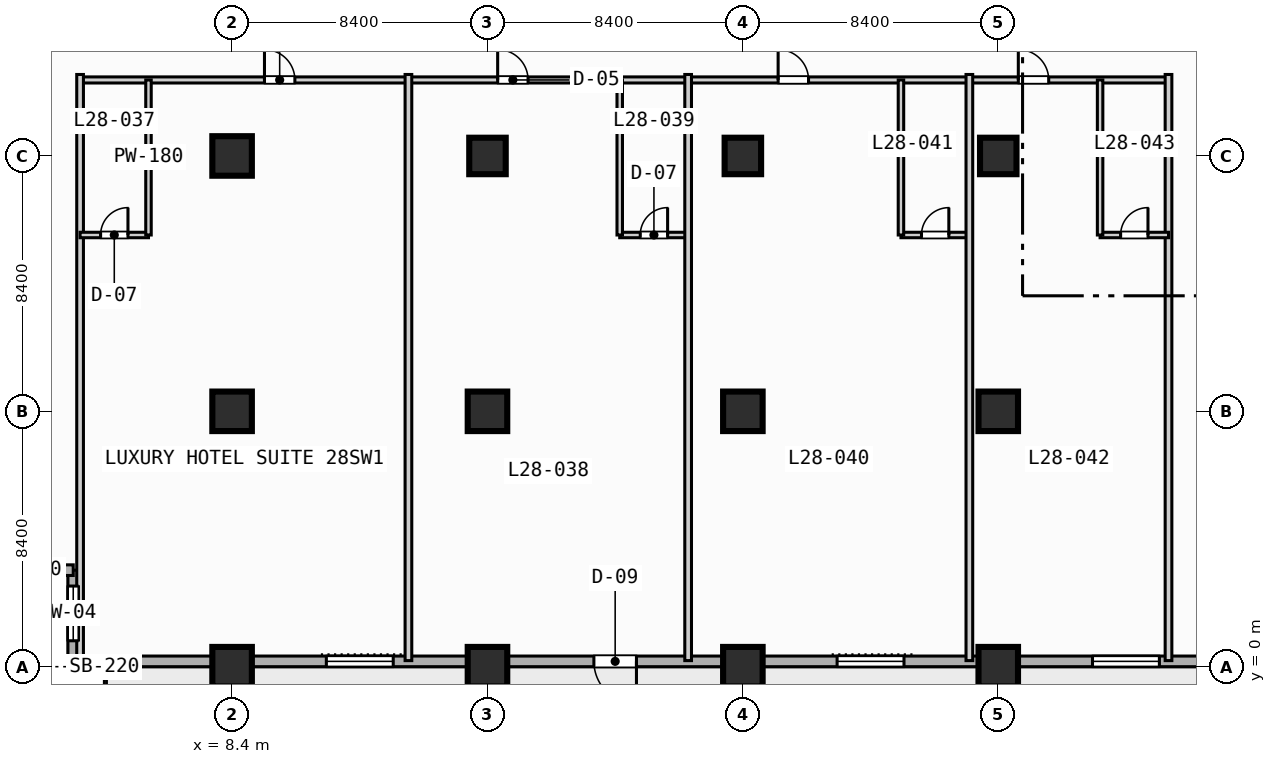
"""IFC4 building model, lengths in metres.
Left out: names, types, materials, properties, quantities, classifications, styles, units other than length and angle.
Written with IfcOpenShell. Run it as: python <this file> out.ifc"""

import sys

from ifc_helpers import new_model, si_unit, direction, frame, frame_2d, origin, origin_2d, place, context, subcontext, project, spatial, rectangle, extrude, element, fill, save


model = new_model("IFC4")
c1 = context("Model", 3, precision=1e-05, world=origin(), true_north=direction((0.0, 1.0)))
c2 = subcontext(c1, "Body", "Model", "MODEL_VIEW")
j1 = project(units=[si_unit("LENGTHUNIT", "METRE"), si_unit("PLANEANGLEUNIT", "RADIAN")], contexts=[c1])
p1 = place(None, origin())
s1 = spatial("IfcSite", under=j1, at=p1, CompositionType="ELEMENT")
p2 = place(p1, origin())
s2 = spatial("IfcBuilding", under=s1, at=p2, CompositionType="ELEMENT")
p3 = place(p2, frame((0.0, 0.0, 119.0)))
s3 = spatial("IfcBuildingStorey", under=s2, at=p3, CompositionType="ELEMENT", Elevation=119.0)
for number, where, z_axis, x_axis in (
    (1, (8.4, 0.0, 0.0), (0.0, 0.0, 1.0), (1.0, 0.0, 0.0)),
    (2, (8.4, 8.4, 0.0), (0.0, 0.0, 1.0), (1.0, 0.0, 0.0)),
    (3, (8.4, 16.8, 0.0), (0.0, 0.0, 1.0), (1.0, 0.0, 0.0)),
    (4, (16.8, 0.0, 0.0), (0.0, 0.0, 1.0), (1.0, 0.0, 0.0)),
    (5, (16.8, 8.4, 0.0), (0.0, 0.0, 1.0), (1.0, 0.0, 0.0)),
):
    element("IfcColumn", number, at=place(p3, frame(where, z_axis=z_axis, x_axis=x_axis)), inside=s3, PredefinedType="COLUMN", context=c2, shape_type="SweptSolid", body=[
        extrude(rectangle(XDim=1.3, YDim=1.3, at=origin_2d()), origin(), (0.0, 0.0, 1.0), 3.8),
    ])
p4 = place(p3, frame((16.8, 16.8, 0.0), z_axis=(0.0, 0.0, 1.0), x_axis=(1.0, 0.0, 0.0)))
e6 = element("IfcColumn", 6, at=p4, inside=s3, PredefinedType="COLUMN", context=c2, shape_type="SweptSolid", body=[
    extrude(rectangle(XDim=1.2, YDim=1.2, at=origin_2d()), origin(), (0.0, 0.0, 1.0), 3.8),
])
for number, where, z_axis, x_axis in (
    (7, (25.2, 0.0, 0.0), (0.0, 0.0, 1.0), (1.0, 0.0, 0.0)),
    (8, (25.2, 8.4, 0.0), (0.0, 0.0, 1.0), (1.0, 0.0, 0.0)),
):
    element("IfcColumn", number, at=place(p3, frame(where, z_axis=z_axis, x_axis=x_axis)), inside=s3, PredefinedType="COLUMN", context=c2, shape_type="SweptSolid", body=[
        extrude(rectangle(XDim=1.3, YDim=1.3, at=origin_2d()), origin(), (0.0, 0.0, 1.0), 3.8),
    ])
p5 = place(p3, frame((25.2, 16.8, 0.0), z_axis=(0.0, 0.0, 1.0), x_axis=(1.0, 0.0, 0.0)))
e9 = element("IfcColumn", 9, at=p5, inside=s3, PredefinedType="COLUMN", context=c2, shape_type="SweptSolid", body=[
    extrude(rectangle(XDim=1.2, YDim=1.2, at=origin_2d()), origin(), (0.0, 0.0, 1.0), 3.8),
])
for number, where, z_axis, x_axis in (
    (10, (33.6, 0.0, 0.0), (0.0, 0.0, 1.0), (1.0, 0.0, 0.0)),
    (11, (33.6, 8.4, 0.0), (0.0, 0.0, 1.0), (1.0, 0.0, 0.0)),
):
    element("IfcColumn", number, at=place(p3, frame(where, z_axis=z_axis, x_axis=x_axis)), inside=s3, PredefinedType="COLUMN", context=c2, shape_type="SweptSolid", body=[
        extrude(rectangle(XDim=1.3, YDim=1.3, at=origin_2d()), origin(), (0.0, 0.0, 1.0), 3.8),
    ])
p6 = place(p3, frame((33.6, 16.8, 0.0), z_axis=(0.0, 0.0, 1.0), x_axis=(1.0, 0.0, 0.0)))
e12 = element("IfcColumn", 12, at=p6, inside=s3, PredefinedType="COLUMN", context=c2, shape_type="SweptSolid", body=[
    extrude(rectangle(XDim=1.2, YDim=1.2, at=origin_2d()), origin(), (0.0, 0.0, 1.0), 3.8),
])
p7 = place(p3, frame((3.175, 0.175, 0.0), z_axis=(0.0, 0.0, 1.0), x_axis=(0.0, 1.0, 0.0)))
e13 = element("IfcWall", 13, at=p7, inside=s3, PredefinedType="STANDARD", context=c2, shape_type="SweptSolid", body=[
    extrude(rectangle(XDim=3.0, YDim=0.35, at=frame_2d((1.5, 0.0))), origin(), (0.0, 0.0, 1.0), 3.55),
])
p8 = place(p7, frame((0.677, 0.0, 0.85)))
e14 = element("IfcOpeningElement", 14, at=p8, cuts=e13, PredefinedType="OPENING", context=c2, shape_type="SweptSolid", body=[
    extrude(rectangle(XDim=1.8, YDim=1.8, at=frame_2d((0.9, 0.9))), frame((0.0, 0.185, 0.0), z_axis=(0.0, -1.0, 0.0), x_axis=(1.0, 0.0, 0.0)), (0.0, 0.0, 1.0), 0.37),
])
p9 = place(p3, frame((3.175, 3.175, 0.0), z_axis=(0.0, 0.0, 1.0), x_axis=(-1.0, 0.0, 0.0)))
e15 = element("IfcWall", 15, at=p9, inside=s3, PredefinedType="STANDARD", context=c2, shape_type="SweptSolid", body=[
    extrude(rectangle(XDim=3.0, YDim=0.35, at=frame_2d((1.5, 0.0))), origin(), (0.0, 0.0, 1.0), 3.55),
])
p10 = place(p3, frame((72.425, 0.175, 0.0), z_axis=(0.0, 0.0, 1.0), x_axis=(-1.0, 0.0, 0.0)))
e16 = element("IfcWall", 16, at=p10, inside=s3, PredefinedType="STANDARD", context=c2, shape_type="SweptSolid", body=[
    extrude(rectangle(XDim=69.25, YDim=0.35, at=frame_2d((34.625, 0.0))), origin(), (0.0, 0.0, 1.0), 3.55),
])
p11 = place(p10, frame((50.725, 0.0, 0.0)))
e17 = element("IfcOpeningElement", 17, at=p11, cuts=e16, PredefinedType="OPENING", context=c2, shape_type="SweptSolid", body=[
    extrude(rectangle(XDim=1.4, YDim=2.2, at=frame_2d((0.7, 1.1))), frame((0.0, 0.185, 0.0), z_axis=(0.0, -1.0, 0.0), x_axis=(1.0, 0.0, 0.0)), (0.0, 0.0, 1.0), 0.37),
])
p12 = place(p10, frame((58.725, 0.0, 0.85)))
e18 = element("IfcOpeningElement", 18, at=p12, cuts=e16, PredefinedType="OPENING", context=c2, shape_type="SweptSolid", body=[
    extrude(rectangle(XDim=2.2, YDim=1.8, at=frame_2d((1.1, 0.9))), frame((0.0, 0.185, 0.0), z_axis=(0.0, -1.0, 0.0), x_axis=(1.0, 0.0, 0.0)), (0.0, 0.0, 1.0), 0.37),
])
p13 = place(p10, frame((41.925, 0.0, 0.85)))
e19 = element("IfcOpeningElement", 19, at=p13, cuts=e16, PredefinedType="OPENING", context=c2, shape_type="SweptSolid", body=[
    extrude(rectangle(XDim=2.2, YDim=1.8, at=frame_2d((1.1, 0.9))), frame((0.0, 0.185, 0.0), z_axis=(0.0, -1.0, 0.0), x_axis=(1.0, 0.0, 0.0)), (0.0, 0.0, 1.0), 0.37),
])
p14 = place(p10, frame((33.525, 0.0, 0.85)))
e20 = element("IfcOpeningElement", 20, at=p14, cuts=e16, PredefinedType="OPENING", context=c2, shape_type="SweptSolid", body=[
    extrude(rectangle(XDim=2.2, YDim=1.8, at=frame_2d((1.1, 0.9))), frame((0.0, 0.185, 0.0), z_axis=(0.0, -1.0, 0.0), x_axis=(1.0, 0.0, 0.0)), (0.0, 0.0, 1.0), 0.37),
])
p15 = place(p10, frame((25.125, 0.0, 0.85)))
e21 = element("IfcOpeningElement", 21, at=p15, cuts=e16, PredefinedType="OPENING", context=c2, shape_type="SweptSolid", body=[
    extrude(rectangle(XDim=2.2, YDim=1.8, at=frame_2d((1.1, 0.9))), frame((0.0, 0.185, 0.0), z_axis=(0.0, -1.0, 0.0), x_axis=(1.0, 0.0, 0.0)), (0.0, 0.0, 1.0), 0.37),
])
p16 = place(p10, frame((8.325, 0.0, 0.85)))
e22 = element("IfcOpeningElement", 22, at=p16, cuts=e16, PredefinedType="OPENING", context=c2, shape_type="SweptSolid", body=[
    extrude(rectangle(XDim=2.2, YDim=1.8, at=frame_2d((1.1, 0.9))), frame((0.0, 0.185, 0.0), z_axis=(0.0, -1.0, 0.0), x_axis=(1.0, 0.0, 0.0)), (0.0, 0.0, 1.0), 0.37),
])
p17 = place(p10, frame((2.125, 0.0, 0.85)))
e23 = element("IfcOpeningElement", 23, at=p17, cuts=e16, PredefinedType="OPENING", context=c2, shape_type="SweptSolid", body=[
    extrude(rectangle(XDim=1.8, YDim=1.8, at=frame_2d((0.9, 0.9))), frame((0.0, 0.185, 0.0), z_axis=(0.0, -1.0, 0.0), x_axis=(1.0, 0.0, 0.0)), (0.0, 0.0, 1.0), 0.37),
])
p18 = place(p3, frame((3.4, 19.3, 0.0), z_axis=(0.0, 0.0, 1.0), x_axis=(1.0, 0.0, 0.0)))
e24 = element("IfcWall", 24, at=p18, inside=s3, PredefinedType="PARTITIONING", context=c2, shape_type="SweptSolid", body=[
    extrude(rectangle(XDim=35.8, YDim=0.2, at=frame_2d((17.9, 0.0))), origin(), (0.0, 0.0, 1.0), 3.55),
])
p19 = place(p18, frame((6.065, 0.0, 0.0)))
e25 = element("IfcOpeningElement", 25, at=p19, cuts=e24, PredefinedType="OPENING", context=c2, shape_type="SweptSolid", body=[
    extrude(rectangle(XDim=1.0, YDim=2.15, at=frame_2d((0.5, 1.075))), frame((0.0, 0.11, 0.0), z_axis=(0.0, -1.0, 0.0), x_axis=(1.0, 0.0, 0.0)), (0.0, 0.0, 1.0), 0.22),
])
p20 = place(p18, frame((13.735, 0.0, 0.0)))
e26 = element("IfcOpeningElement", 26, at=p20, cuts=e24, PredefinedType="OPENING", context=c2, shape_type="SweptSolid", body=[
    extrude(rectangle(XDim=1.0, YDim=2.15, at=frame_2d((0.5, 1.075))), frame((0.0, 0.11, 0.0), z_axis=(0.0, -1.0, 0.0), x_axis=(1.0, 0.0, 0.0)), (0.0, 0.0, 1.0), 0.22),
])
p21 = place(p18, frame((22.96, 0.0, 0.0)))
e27 = element("IfcOpeningElement", 27, at=p21, cuts=e24, PredefinedType="OPENING", context=c2, shape_type="SweptSolid", body=[
    extrude(rectangle(XDim=1.0, YDim=2.15, at=frame_2d((0.5, 1.075))), frame((0.0, 0.11, 0.0), z_axis=(0.0, -1.0, 0.0), x_axis=(1.0, 0.0, 0.0)), (0.0, 0.0, 1.0), 0.22),
])
p22 = place(p18, frame((30.86, 0.0, 0.0)))
e28 = element("IfcOpeningElement", 28, at=p22, cuts=e24, PredefinedType="OPENING", context=c2, shape_type="SweptSolid", body=[
    extrude(rectangle(XDim=1.0, YDim=2.15, at=frame_2d((0.5, 1.075))), frame((0.0, 0.11, 0.0), z_axis=(0.0, -1.0, 0.0), x_axis=(1.0, 0.0, 0.0)), (0.0, 0.0, 1.0), 0.22),
])
p23 = place(p3, frame((3.4, 0.2, 0.0), z_axis=(0.0, 0.0, 1.0), x_axis=(0.0, 1.0, 0.0)))
e29 = element("IfcWall", 29, at=p23, inside=s3, PredefinedType="PARTITIONING", context=c2, shape_type="SweptSolid", body=[
    extrude(rectangle(XDim=19.28, YDim=0.22, at=frame_2d((9.64, 0.0))), origin(), (0.0, 0.0, 1.0), 3.55),
])
p24 = place(p3, frame((3.4, 14.2, 0.0), z_axis=(0.0, 0.0, 1.0), x_axis=(1.0, 0.0, 0.0)))
e30 = element("IfcWall", 30, at=p24, inside=s3, PredefinedType="PLUMBINGWALL", context=c2, shape_type="SweptSolid", body=[
    extrude(rectangle(XDim=2.25, YDim=0.18, at=frame_2d((1.125, 0.0))), origin(), (0.0, 0.0, 1.0), 3.55),
])
p25 = place(p24, frame((0.675, 0.0, 0.0)))
e31 = element("IfcOpeningElement", 31, at=p25, cuts=e30, PredefinedType="OPENING", context=c2, shape_type="SweptSolid", body=[
    extrude(rectangle(XDim=0.9, YDim=2.1, at=frame_2d((0.45, 1.05))), frame((0.0, 0.1, 0.0), z_axis=(0.0, -1.0, 0.0), x_axis=(1.0, 0.0, 0.0)), (0.0, 0.0, 1.0), 0.2),
])
p26 = place(p3, frame((5.65, 14.2, 0.0), z_axis=(0.0, 0.0, 1.0), x_axis=(0.0, 1.0, 0.0)))
e32 = element("IfcWall", 32, at=p26, inside=s3, PredefinedType="PLUMBINGWALL", context=c2, shape_type="SweptSolid", body=[
    extrude(rectangle(XDim=5.1, YDim=0.18, at=frame_2d((2.55, 0.0))), origin(), (0.0, 0.0, 1.0), 3.55),
])
p27 = place(p3, frame((14.2, 0.2, 0.0), z_axis=(0.0, 0.0, 1.0), x_axis=(0.0, 1.0, 0.0)))
e33 = element("IfcWall", 33, at=p27, inside=s3, PredefinedType="PARTITIONING", context=c2, shape_type="SweptSolid", body=[
    extrude(rectangle(XDim=19.28, YDim=0.22, at=frame_2d((9.64, 0.0))), origin(), (0.0, 0.0, 1.0), 3.55),
])
p28 = place(p3, frame((21.15, 14.2, 0.0), z_axis=(0.0, 0.0, 1.0), x_axis=(1.0, 0.0, 0.0)))
e34 = element("IfcWall", 34, at=p28, inside=s3, PredefinedType="PLUMBINGWALL", context=c2, shape_type="SweptSolid", body=[
    extrude(rectangle(XDim=2.25, YDim=0.18, at=frame_2d((1.125, 0.0))), origin(), (0.0, 0.0, 1.0), 3.55),
])
p29 = place(p28, frame((0.675, 0.0, 0.0)))
e35 = element("IfcOpeningElement", 35, at=p29, cuts=e34, PredefinedType="OPENING", context=c2, shape_type="SweptSolid", body=[
    extrude(rectangle(XDim=0.9, YDim=2.1, at=frame_2d((0.45, 1.05))), frame((0.0, 0.1, 0.0), z_axis=(0.0, -1.0, 0.0), x_axis=(1.0, 0.0, 0.0)), (0.0, 0.0, 1.0), 0.2),
])
p30 = place(p3, frame((21.15, 14.2, 0.0), z_axis=(0.0, 0.0, 1.0), x_axis=(0.0, 1.0, 0.0)))
e36 = element("IfcWall", 36, at=p30, inside=s3, PredefinedType="PLUMBINGWALL", context=c2, shape_type="SweptSolid", body=[
    extrude(rectangle(XDim=5.1, YDim=0.18, at=frame_2d((2.55, 0.0))), origin(), (0.0, 0.0, 1.0), 3.55),
])
p31 = place(p3, frame((23.4, 0.2, 0.0), z_axis=(0.0, 0.0, 1.0), x_axis=(0.0, 1.0, 0.0)))
e37 = element("IfcWall", 37, at=p31, inside=s3, PredefinedType="PARTITIONING", context=c2, shape_type="SweptSolid", body=[
    extrude(rectangle(XDim=19.28, YDim=0.22, at=frame_2d((9.64, 0.0))), origin(), (0.0, 0.0, 1.0), 3.55),
])
p32 = place(p3, frame((30.4, 14.2, 0.0), z_axis=(0.0, 0.0, 1.0), x_axis=(1.0, 0.0, 0.0)))
e38 = element("IfcWall", 38, at=p32, inside=s3, PredefinedType="PLUMBINGWALL", context=c2, shape_type="SweptSolid", body=[
    extrude(rectangle(XDim=2.25, YDim=0.18, at=frame_2d((1.125, 0.0))), origin(), (0.0, 0.0, 1.0), 3.55),
])
p33 = place(p32, frame((0.675, 0.0, 0.0)))
e39 = element("IfcOpeningElement", 39, at=p33, cuts=e38, PredefinedType="OPENING", context=c2, shape_type="SweptSolid", body=[
    extrude(rectangle(XDim=0.9, YDim=2.1, at=frame_2d((0.45, 1.05))), frame((0.0, 0.1, 0.0), z_axis=(0.0, -1.0, 0.0), x_axis=(1.0, 0.0, 0.0)), (0.0, 0.0, 1.0), 0.2),
])
p34 = place(p3, frame((30.4, 14.2, 0.0), z_axis=(0.0, 0.0, 1.0), x_axis=(0.0, 1.0, 0.0)))
e40 = element("IfcWall", 40, at=p34, inside=s3, PredefinedType="PLUMBINGWALL", context=c2, shape_type="SweptSolid", body=[
    extrude(rectangle(XDim=5.1, YDim=0.18, at=frame_2d((2.55, 0.0))), origin(), (0.0, 0.0, 1.0), 3.55),
])
for number, where, z_axis, x_axis in (
    (41, (32.65, 0.2, 0.0), (0.0, 0.0, 1.0), (0.0, 1.0, 0.0)),
    (42, (39.2, 0.2, 0.0), (0.0, 0.0, 1.0), (0.0, 1.0, 0.0)),
):
    element("IfcWall", number, at=place(p3, frame(where, z_axis=z_axis, x_axis=x_axis)), inside=s3, PredefinedType="PARTITIONING", context=c2, shape_type="SweptSolid", body=[
        extrude(rectangle(XDim=19.28, YDim=0.22, at=frame_2d((9.64, 0.0))), origin(), (0.0, 0.0, 1.0), 3.55),
    ])
p35 = place(p3, frame((36.95, 14.2, 0.0), z_axis=(0.0, 0.0, 1.0), x_axis=(1.0, 0.0, 0.0)))
e43 = element("IfcWall", 43, at=p35, inside=s3, PredefinedType="PLUMBINGWALL", context=c2, shape_type="SweptSolid", body=[
    extrude(rectangle(XDim=2.25, YDim=0.18, at=frame_2d((1.125, 0.0))), origin(), (0.0, 0.0, 1.0), 3.55),
])
p36 = place(p35, frame((0.675, 0.0, 0.0)))
e44 = element("IfcOpeningElement", 44, at=p36, cuts=e43, PredefinedType="OPENING", context=c2, shape_type="SweptSolid", body=[
    extrude(rectangle(XDim=0.9, YDim=2.1, at=frame_2d((0.45, 1.05))), frame((0.0, 0.1, 0.0), z_axis=(0.0, -1.0, 0.0), x_axis=(1.0, 0.0, 0.0)), (0.0, 0.0, 1.0), 0.2),
])
p37 = place(p3, frame((36.95, 14.2, 0.0), z_axis=(0.0, 0.0, 1.0), x_axis=(0.0, 1.0, 0.0)))
e45 = element("IfcWall", 45, at=p37, inside=s3, PredefinedType="PLUMBINGWALL", context=c2, shape_type="SweptSolid", body=[
    extrude(rectangle(XDim=5.1, YDim=0.18, at=frame_2d((2.55, 0.0))), origin(), (0.0, 0.0, 1.0), 3.55),
])
p38 = place(p8, origin())
e46 = element("IfcWindow", 46, at=p38, inside=s3, PartitioningType="SINGLE_PANEL", PredefinedType="WINDOW", context=c2, shape_type="SweptSolid", body=[
    extrude(rectangle(XDim=1.8, YDim=1.8, at=frame_2d((0.9, 0.9))), frame((0.0, 0.03, 0.0), z_axis=(0.0, -1.0, 0.0), x_axis=(1.0, 0.0, 0.0)), (0.0, 0.0, 1.0), 0.06),
])
fill(e14, e46)
p39 = place(p11, origin())
e47 = element("IfcDoor", 47, at=p39, inside=s3, OperationType="SINGLE_SWING_LEFT", PredefinedType="DOOR", context=c2, shape_type="SweptSolid", body=[
    extrude(rectangle(XDim=1.4, YDim=2.2, at=frame_2d((0.7, 1.1))), frame((0.0, 0.025, 0.0), z_axis=(0.0, -1.0, 0.0), x_axis=(1.0, 0.0, 0.0)), (0.0, 0.0, 1.0), 0.05),
])
fill(e17, e47)
p40 = place(p12, origin())
e48 = element("IfcWindow", 48, at=p40, inside=s3, PartitioningType="SINGLE_PANEL", PredefinedType="WINDOW", context=c2, shape_type="SweptSolid", body=[
    extrude(rectangle(XDim=2.2, YDim=1.8, at=frame_2d((1.1, 0.9))), frame((0.0, 0.03, 0.0), z_axis=(0.0, -1.0, 0.0), x_axis=(1.0, 0.0, 0.0)), (0.0, 0.0, 1.0), 0.06),
])
fill(e18, e48)
p41 = place(p13, origin())
e49 = element("IfcWindow", 49, at=p41, inside=s3, PartitioningType="SINGLE_PANEL", PredefinedType="WINDOW", context=c2, shape_type="SweptSolid", body=[
    extrude(rectangle(XDim=2.2, YDim=1.8, at=frame_2d((1.1, 0.9))), frame((0.0, 0.03, 0.0), z_axis=(0.0, -1.0, 0.0), x_axis=(1.0, 0.0, 0.0)), (0.0, 0.0, 1.0), 0.06),
])
fill(e19, e49)
p42 = place(p14, origin())
e50 = element("IfcWindow", 50, at=p42, inside=s3, PartitioningType="SINGLE_PANEL", PredefinedType="WINDOW", context=c2, shape_type="SweptSolid", body=[
    extrude(rectangle(XDim=2.2, YDim=1.8, at=frame_2d((1.1, 0.9))), frame((0.0, 0.03, 0.0), z_axis=(0.0, -1.0, 0.0), x_axis=(1.0, 0.0, 0.0)), (0.0, 0.0, 1.0), 0.06),
])
fill(e20, e50)
p43 = place(p19, origin())
e51 = element("IfcDoor", 51, at=p43, inside=s3, OperationType="SINGLE_SWING_LEFT", PredefinedType="DOOR", context=c2, shape_type="SweptSolid", body=[
    extrude(rectangle(XDim=1.0, YDim=2.15, at=frame_2d((0.5, 1.075))), frame((0.0, 0.025, 0.0), z_axis=(0.0, -1.0, 0.0), x_axis=(1.0, 0.0, 0.0)), (0.0, 0.0, 1.0), 0.05),
])
fill(e25, e51)
p44 = place(p20, origin())
e52 = element("IfcDoor", 52, at=p44, inside=s3, OperationType="SINGLE_SWING_LEFT", PredefinedType="DOOR", context=c2, shape_type="SweptSolid", body=[
    extrude(rectangle(XDim=1.0, YDim=2.15, at=frame_2d((0.5, 1.075))), frame((0.0, 0.025, 0.0), z_axis=(0.0, -1.0, 0.0), x_axis=(1.0, 0.0, 0.0)), (0.0, 0.0, 1.0), 0.05),
])
fill(e26, e52)
p45 = place(p21, origin())
e53 = element("IfcDoor", 53, at=p45, inside=s3, OperationType="SINGLE_SWING_LEFT", PredefinedType="DOOR", context=c2, shape_type="SweptSolid", body=[
    extrude(rectangle(XDim=1.0, YDim=2.15, at=frame_2d((0.5, 1.075))), frame((0.0, 0.025, 0.0), z_axis=(0.0, -1.0, 0.0), x_axis=(1.0, 0.0, 0.0)), (0.0, 0.0, 1.0), 0.05),
])
fill(e27, e53)
p46 = place(p22, origin())
e54 = element("IfcDoor", 54, at=p46, inside=s3, OperationType="SINGLE_SWING_LEFT", PredefinedType="DOOR", context=c2, shape_type="SweptSolid", body=[
    extrude(rectangle(XDim=1.0, YDim=2.15, at=frame_2d((0.5, 1.075))), frame((0.0, 0.025, 0.0), z_axis=(0.0, -1.0, 0.0), x_axis=(1.0, 0.0, 0.0)), (0.0, 0.0, 1.0), 0.05),
])
fill(e28, e54)
p47 = place(p25, origin())
e55 = element("IfcDoor", 55, at=p47, inside=s3, OperationType="SINGLE_SWING_RIGHT", PredefinedType="DOOR", context=c2, shape_type="SweptSolid", body=[
    extrude(rectangle(XDim=0.9, YDim=2.1, at=frame_2d((0.45, 1.05))), frame((0.0, 0.025, 0.0), z_axis=(0.0, -1.0, 0.0), x_axis=(1.0, 0.0, 0.0)), (0.0, 0.0, 1.0), 0.05),
])
fill(e31, e55)
p48 = place(p29, origin())
e56 = element("IfcDoor", 56, at=p48, inside=s3, OperationType="SINGLE_SWING_RIGHT", PredefinedType="DOOR", context=c2, shape_type="SweptSolid", body=[
    extrude(rectangle(XDim=0.9, YDim=2.1, at=frame_2d((0.45, 1.05))), frame((0.0, 0.025, 0.0), z_axis=(0.0, -1.0, 0.0), x_axis=(1.0, 0.0, 0.0)), (0.0, 0.0, 1.0), 0.05),
])
fill(e35, e56)
p49 = place(p33, origin())
e57 = element("IfcDoor", 57, at=p49, inside=s3, OperationType="SINGLE_SWING_RIGHT", PredefinedType="DOOR", context=c2, shape_type="SweptSolid", body=[
    extrude(rectangle(XDim=0.9, YDim=2.1, at=frame_2d((0.45, 1.05))), frame((0.0, 0.025, 0.0), z_axis=(0.0, -1.0, 0.0), x_axis=(1.0, 0.0, 0.0)), (0.0, 0.0, 1.0), 0.05),
])
fill(e39, e57)
p50 = place(p36, origin())
e58 = element("IfcDoor", 58, at=p50, inside=s3, OperationType="SINGLE_SWING_RIGHT", PredefinedType="DOOR", context=c2, shape_type="SweptSolid", body=[
    extrude(rectangle(XDim=0.9, YDim=2.1, at=frame_2d((0.45, 1.05))), frame((0.0, 0.025, 0.0), z_axis=(0.0, -1.0, 0.0), x_axis=(1.0, 0.0, 0.0)), (0.0, 0.0, 1.0), 0.05),
])
fill(e44, e58)
save(model, sys.argv[1])
